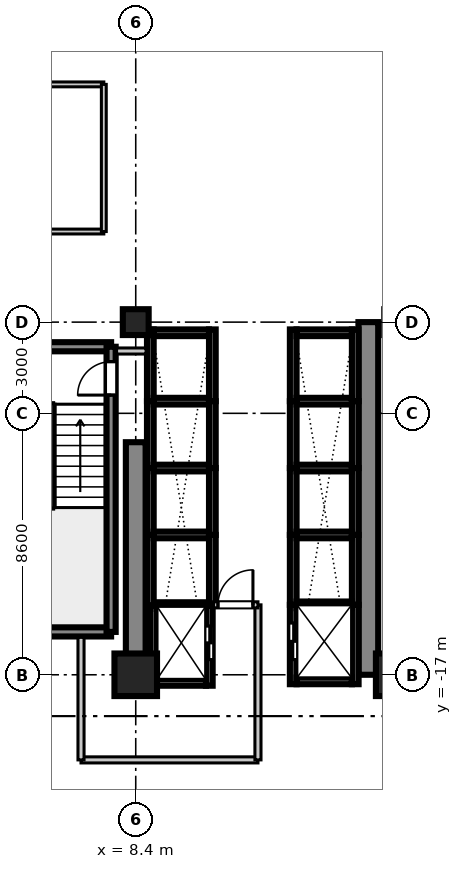
"""IFC4 building model, lengths in metres.
Left out: names, types, materials, properties, quantities, classifications, styles, units other than length and angle.
Written with IfcOpenShell. Run it as: python <this file> out.ifc"""

import sys

from ifc_helpers import new_model, si_unit, direction, frame, frame_2d, origin, origin_2d, place, context, subcontext, project, spatial, rectangle, extrude, source, transform, mapped, element, fill, save


model = new_model("IFC4")
c1 = context("Model", 3, precision=1e-05, world=origin(), true_north=direction((0.0, 1.0)))
c2 = subcontext(c1, "Body", "Model", "MODEL_VIEW")
j1 = project(units=[si_unit("LENGTHUNIT", "METRE"), si_unit("PLANEANGLEUNIT", "RADIAN")], contexts=[c1])
p1 = place(None, origin())
s1 = spatial("IfcSite", under=j1, at=p1, CompositionType="ELEMENT")
p2 = place(p1, origin())
s2 = spatial("IfcBuilding", under=s1, at=p2, CompositionType="ELEMENT")
p3 = place(p2, frame((0.0, 0.0, 32.4)))
s3 = spatial("IfcBuildingStorey", under=s2, at=p3, CompositionType="ELEMENT", Elevation=32.4)
m1 = source(origin(), c2, "Body", "SweptSolid", [
    extrude(rectangle(XDim=1.4, YDim=1.4, at=origin_2d()), origin(), (0.0, 0.0, 1.0), 3.605),
])
p4 = place(p3, frame((8.4, -17.0, 0.0), z_axis=(0.0, 0.0, 1.0), x_axis=(1.0, 0.0, 0.0)))
e1 = element("IfcColumn", 1, at=p4, inside=s3, PredefinedType="COLUMN", context=c2, shape_type="MappedRepresentation", body=[
    mapped(m1, transform((0.0, 0.0, 0.0), scale=1.0)),
])
m2 = source(origin(), c2, "Body", "SweptSolid", [
    extrude(rectangle(XDim=0.85, YDim=0.85, at=origin_2d()), origin(), (0.0, 0.0, 1.0), 3.605),
])
p5 = place(p3, frame((8.4, -5.4, 0.0), z_axis=(0.0, 0.0, 1.0), x_axis=(1.0, 0.0, 0.0)))
e2 = element("IfcColumn", 2, at=p5, inside=s3, PredefinedType="PILASTER", context=c2, shape_type="MappedRepresentation", body=[
    mapped(m2, transform((0.0, 0.0, 0.0), scale=1.0)),
])
p6 = place(p3, frame((17.0, -17.0, 0.0), z_axis=(0.0, 0.0, 1.0), x_axis=(1.0, 0.0, 0.0)))
e3 = element("IfcColumn", 3, at=p6, inside=s3, PredefinedType="COLUMN", context=c2, shape_type="MappedRepresentation", body=[
    mapped(m1, transform((0.0, 0.0, 0.0), scale=1.0)),
])
m3 = source(origin(), c2, "Body", "SweptSolid", [
    extrude(rectangle(XDim=7.65, YDim=0.65, at=frame_2d((3.825, 0.0))), origin(), (0.0, 0.0, 1.0), 3.37),
])
p7 = place(p3, frame((8.4, -17.0, 0.0), z_axis=(0.0, 0.0, 1.0), x_axis=(0.0, 1.0, 0.0)))
e4 = element("IfcWall", 4, at=p7, inside=s3, PredefinedType="SHEAR", context=c2, shape_type="MappedRepresentation", body=[
    mapped(m3, transform((0.0, 0.0, 0.0), scale=1.0)),
])
m4 = source(origin(), c2, "Body", "SweptSolid", [
    extrude(rectangle(XDim=11.6, YDim=0.65, at=frame_2d((5.8, 0.0))), origin(), (0.0, 0.0, 1.0), 3.37),
])
p8 = place(p3, frame((16.05, -17.0, 0.0), z_axis=(0.0, 0.0, 1.0), x_axis=(0.0, 1.0, 0.0)))
e5 = element("IfcWall", 5, at=p8, inside=s3, PredefinedType="SHEAR", context=c2, shape_type="MappedRepresentation", body=[
    mapped(m4, transform((0.0, 0.0, 0.0), scale=1.0)),
])
m5 = source(origin(), c2, "Body", "SweptSolid", [
    extrude(rectangle(XDim=3.98, YDim=0.3, at=frame_2d((1.99, 0.0))), origin(), (0.0, 0.0, 1.0), 3.37),
])
for number, where, z_axis, x_axis in (
    (6, (3.61, -15.59, 0.0), (0.0, 0.0, 1.0), (1.0, 0.0, 0.0)),
    (7, (3.61, -6.21, 0.0), (0.0, 0.0, 1.0), (1.0, 0.0, 0.0)),
):
    element("IfcWall", number, at=place(p3, frame(where, z_axis=z_axis, x_axis=x_axis)), inside=s3, PredefinedType="SHEAR", context=c2, shape_type="MappedRepresentation", body=[
        mapped(m5, transform((0.0, 0.0, 0.0), scale=1.0)),
    ])
m6 = source(origin(), c2, "Body", "SweptSolid", [
    extrude(rectangle(XDim=9.38, YDim=0.3, at=frame_2d((4.69, 0.0))), origin(), (0.0, 0.0, 1.0), 3.37),
])
p9 = place(p3, frame((7.59, -15.59, 0.0), z_axis=(0.0, 0.0, 1.0), x_axis=(0.0, 1.0, 0.0)))
e8 = element("IfcWall", 8, at=p9, inside=s3, PredefinedType="SHEAR", context=c2, shape_type="MappedRepresentation", body=[
    mapped(m6, transform((0.0, 0.0, 0.0), scale=1.0)),
])
p10 = place(p9, frame((7.79, 0.0, 0.0)))
e9 = element("IfcOpeningElement", 9, at=p10, cuts=e8, PredefinedType="OPENING", context=c2, shape_type="SweptSolid", body=[
    extrude(rectangle(XDim=1.1, YDim=2.15, at=frame_2d((0.55, 1.075))), frame((0.0, 0.16, 0.0), z_axis=(0.0, -1.0, 0.0), x_axis=(1.0, 0.0, 0.0)), (0.0, 0.0, 1.0), 0.32),
])
m7 = source(origin(), c2, "Body", "SweptSolid", [
    extrude(rectangle(XDim=2.36, YDim=0.22, at=frame_2d((1.18, 0.0))), origin(), (0.0, 0.0, 1.0), 3.37),
])
for number, where, z_axis, x_axis in (
    (10, (13.58, -8.0, 0.0), (0.0, 0.0, 1.0), (0.0, 1.0, 0.0)),
    (11, (15.62, -8.0, 0.0), (0.0, 0.0, 1.0), (0.0, 1.0, 0.0)),
):
    element("IfcWall", number, at=place(p3, frame(where, z_axis=z_axis, x_axis=x_axis)), inside=s3, PredefinedType="SHEAR", context=c2, shape_type="MappedRepresentation", body=[
        mapped(m7, transform((0.0, 0.0, 0.0), scale=1.0)),
    ])
m8 = source(origin(), c2, "Body", "SweptSolid", [
    extrude(rectangle(XDim=1.82, YDim=0.22, at=frame_2d((0.91, 0.0))), origin(), (0.0, 0.0, 1.0), 3.37),
])
p11 = place(p3, frame((13.69, -5.75, 0.0), z_axis=(0.0, 0.0, 1.0), x_axis=(1.0, 0.0, 0.0)))
e12 = element("IfcWall", 12, at=p11, inside=s3, PredefinedType="SHEAR", context=c2, shape_type="MappedRepresentation", body=[
    mapped(m8, transform((0.0, 0.0, 0.0), scale=1.0)),
])
m9 = source(origin(), c2, "Body", "SweptSolid", [
    extrude(rectangle(XDim=2.2, YDim=0.22, at=frame_2d((1.1, 0.0))), origin(), (0.0, 0.0, 1.0), 3.37),
])
for number, where, z_axis, x_axis in (
    (13, (13.58, -10.2, 0.0), (0.0, 0.0, 1.0), (0.0, 1.0, 0.0)),
    (14, (15.62, -10.2, 0.0), (0.0, 0.0, 1.0), (0.0, 1.0, 0.0)),
):
    element("IfcWall", number, at=place(p3, frame(where, z_axis=z_axis, x_axis=x_axis)), inside=s3, PredefinedType="SHEAR", context=c2, shape_type="MappedRepresentation", body=[
        mapped(m9, transform((0.0, 0.0, 0.0), scale=1.0)),
    ])
m10 = source(origin(), c2, "Body", "SweptSolid", [
    extrude(rectangle(XDim=1.82, YDim=0.22, at=frame_2d((0.91, 0.0))), origin(), (0.0, 0.0, 1.0), 3.65),
])
p12 = place(p3, frame((13.69, -8.0, 0.0), z_axis=(0.0, 0.0, 1.0), x_axis=(1.0, 0.0, 0.0)))
e15 = element("IfcWall", 15, at=p12, inside=s3, PredefinedType="SHEAR", context=c2, shape_type="MappedRepresentation", body=[
    mapped(m10, transform((0.0, 0.0, 0.0), scale=1.0)),
])
for number, where, z_axis, x_axis in (
    (16, (13.58, -12.4, 0.0), (0.0, 0.0, 1.0), (0.0, 1.0, 0.0)),
    (17, (15.62, -12.4, 0.0), (0.0, 0.0, 1.0), (0.0, 1.0, 0.0)),
):
    element("IfcWall", number, at=place(p3, frame(where, z_axis=z_axis, x_axis=x_axis)), inside=s3, PredefinedType="SHEAR", context=c2, shape_type="MappedRepresentation", body=[
        mapped(m9, transform((0.0, 0.0, 0.0), scale=1.0)),
    ])
p13 = place(p3, frame((13.69, -10.2, 0.0), z_axis=(0.0, 0.0, 1.0), x_axis=(1.0, 0.0, 0.0)))
e18 = element("IfcWall", 18, at=p13, inside=s3, PredefinedType="SHEAR", context=c2, shape_type="MappedRepresentation", body=[
    mapped(m10, transform((0.0, 0.0, 0.0), scale=1.0)),
])
m11 = source(origin(), c2, "Body", "SweptSolid", [
    extrude(rectangle(XDim=2.3, YDim=0.22, at=frame_2d((1.15, 0.0))), origin(), (0.0, 0.0, 1.0), 3.37),
])
for number, where, z_axis, x_axis in (
    (19, (13.58, -14.7, 0.0), (0.0, 0.0, 1.0), (0.0, 1.0, 0.0)),
    (20, (15.62, -14.7, 0.0), (0.0, 0.0, 1.0), (0.0, 1.0, 0.0)),
):
    element("IfcWall", number, at=place(p3, frame(where, z_axis=z_axis, x_axis=x_axis)), inside=s3, PredefinedType="SHEAR", context=c2, shape_type="MappedRepresentation", body=[
        mapped(m11, transform((0.0, 0.0, 0.0), scale=1.0)),
    ])
p14 = place(p3, frame((13.69, -12.4, 0.0), z_axis=(0.0, 0.0, 1.0), x_axis=(1.0, 0.0, 0.0)))
e21 = element("IfcWall", 21, at=p14, inside=s3, PredefinedType="SHEAR", context=c2, shape_type="MappedRepresentation", body=[
    mapped(m10, transform((0.0, 0.0, 0.0), scale=1.0)),
])
for number, where, z_axis, x_axis in (
    (22, (8.88, -8.0, 0.0), (0.0, 0.0, 1.0), (0.0, 1.0, 0.0)),
    (23, (10.92, -8.0, 0.0), (0.0, 0.0, 1.0), (0.0, 1.0, 0.0)),
):
    element("IfcWall", number, at=place(p3, frame(where, z_axis=z_axis, x_axis=x_axis)), inside=s3, PredefinedType="SHEAR", context=c2, shape_type="MappedRepresentation", body=[
        mapped(m7, transform((0.0, 0.0, 0.0), scale=1.0)),
    ])
p15 = place(p3, frame((8.99, -5.75, 0.0), z_axis=(0.0, 0.0, 1.0), x_axis=(1.0, 0.0, 0.0)))
e24 = element("IfcWall", 24, at=p15, inside=s3, PredefinedType="SHEAR", context=c2, shape_type="MappedRepresentation", body=[
    mapped(m8, transform((0.0, 0.0, 0.0), scale=1.0)),
])
for number, where, z_axis, x_axis in (
    (25, (8.88, -10.2, 0.0), (0.0, 0.0, 1.0), (0.0, 1.0, 0.0)),
    (26, (10.92, -10.2, 0.0), (0.0, 0.0, 1.0), (0.0, 1.0, 0.0)),
):
    element("IfcWall", number, at=place(p3, frame(where, z_axis=z_axis, x_axis=x_axis)), inside=s3, PredefinedType="SHEAR", context=c2, shape_type="MappedRepresentation", body=[
        mapped(m9, transform((0.0, 0.0, 0.0), scale=1.0)),
    ])
p16 = place(p3, frame((8.99, -8.0, 0.0), z_axis=(0.0, 0.0, 1.0), x_axis=(1.0, 0.0, 0.0)))
e27 = element("IfcWall", 27, at=p16, inside=s3, PredefinedType="SHEAR", context=c2, shape_type="MappedRepresentation", body=[
    mapped(m10, transform((0.0, 0.0, 0.0), scale=1.0)),
])
for number, where, z_axis, x_axis in (
    (28, (8.88, -12.4, 0.0), (0.0, 0.0, 1.0), (0.0, 1.0, 0.0)),
    (29, (10.92, -12.4, 0.0), (0.0, 0.0, 1.0), (0.0, 1.0, 0.0)),
):
    element("IfcWall", number, at=place(p3, frame(where, z_axis=z_axis, x_axis=x_axis)), inside=s3, PredefinedType="SHEAR", context=c2, shape_type="MappedRepresentation", body=[
        mapped(m9, transform((0.0, 0.0, 0.0), scale=1.0)),
    ])
p17 = place(p3, frame((8.99, -10.2, 0.0), z_axis=(0.0, 0.0, 1.0), x_axis=(1.0, 0.0, 0.0)))
e30 = element("IfcWall", 30, at=p17, inside=s3, PredefinedType="SHEAR", context=c2, shape_type="MappedRepresentation", body=[
    mapped(m10, transform((0.0, 0.0, 0.0), scale=1.0)),
])
m12 = source(origin(), c2, "Body", "SweptSolid", [
    extrude(rectangle(XDim=2.325, YDim=0.22, at=frame_2d((1.163, 0.0))), origin(), (0.0, 0.0, 1.0), 3.37),
])
for number, where, z_axis, x_axis in (
    (31, (8.88, -14.725, 0.0), (0.0, 0.0, 1.0), (0.0, 1.0, 0.0)),
    (32, (10.92, -14.725, 0.0), (0.0, 0.0, 1.0), (0.0, 1.0, 0.0)),
):
    element("IfcWall", number, at=place(p3, frame(where, z_axis=z_axis, x_axis=x_axis)), inside=s3, PredefinedType="SHEAR", context=c2, shape_type="MappedRepresentation", body=[
        mapped(m12, transform((0.0, 0.0, 0.0), scale=1.0)),
    ])
p18 = place(p3, frame((8.99, -12.4, 0.0), z_axis=(0.0, 0.0, 1.0), x_axis=(1.0, 0.0, 0.0)))
e33 = element("IfcWall", 33, at=p18, inside=s3, PredefinedType="SHEAR", context=c2, shape_type="MappedRepresentation", body=[
    mapped(m10, transform((0.0, 0.0, 0.0), scale=1.0)),
])
m13 = source(origin(), c2, "Body", "SweptSolid", [
    extrude(rectangle(XDim=2.635, YDim=0.22, at=frame_2d((1.317, 0.0))), origin(), (0.0, 0.0, 1.0), 3.37),
])
p19 = place(p3, frame((8.98, -17.36, 0.0), z_axis=(0.0, 0.0, 1.0), x_axis=(0.0, 1.0, 0.0)))
e34 = element("IfcWall", 34, at=p19, inside=s3, PredefinedType="SHEAR", context=c2, shape_type="MappedRepresentation", body=[
    mapped(m13, transform((0.0, 0.0, 0.0), scale=1.0)),
])
p20 = place(p3, frame((10.82, -17.36, 0.0), z_axis=(0.0, 0.0, 1.0), x_axis=(0.0, 1.0, 0.0)))
e35 = element("IfcWall", 35, at=p20, inside=s3, PredefinedType="SHEAR", context=c2, shape_type="MappedRepresentation", body=[
    mapped(m13, transform((0.0, 0.0, 0.0), scale=1.0)),
])
p21 = place(p20, frame((0.86, 0.0, 0.0)))
e36 = element("IfcOpeningElement", 36, at=p21, cuts=e35, PredefinedType="OPENING", context=c2, shape_type="SweptSolid", body=[
    extrude(rectangle(XDim=1.1, YDim=2.2, at=frame_2d((0.55, 1.1))), frame((0.0, 0.12, 0.0), z_axis=(0.0, -1.0, 0.0), x_axis=(1.0, 0.0, 0.0)), (0.0, 0.0, 1.0), 0.24),
])
m14 = source(origin(), c2, "Body", "SweptSolid", [
    extrude(rectangle(XDim=1.62, YDim=0.22, at=frame_2d((0.81, 0.0))), origin(), (0.0, 0.0, 1.0), 3.37),
])
p22 = place(p3, frame((9.09, -17.25, 0.0), z_axis=(0.0, 0.0, 1.0), x_axis=(1.0, 0.0, 0.0)))
e37 = element("IfcWall", 37, at=p22, inside=s3, PredefinedType="SHEAR", context=c2, shape_type="MappedRepresentation", body=[
    mapped(m14, transform((0.0, 0.0, 0.0), scale=1.0)),
])
m15 = source(origin(), c2, "Body", "SweptSolid", [
    extrude(rectangle(XDim=1.62, YDim=0.22, at=frame_2d((0.81, 0.0))), origin(), (0.0, 0.0, 1.0), 3.65),
])
p23 = place(p3, frame((9.09, -14.725, 0.0), z_axis=(0.0, 0.0, 1.0), x_axis=(1.0, 0.0, 0.0)))
e38 = element("IfcWall", 38, at=p23, inside=s3, PredefinedType="SHEAR", context=c2, shape_type="MappedRepresentation", body=[
    mapped(m15, transform((0.0, 0.0, 0.0), scale=1.0)),
])
m16 = source(origin(), c2, "Body", "SweptSolid", [
    extrude(rectangle(XDim=2.61, YDim=0.22, at=frame_2d((1.305, 0.0))), origin(), (0.0, 0.0, 1.0), 3.37),
])
p24 = place(p3, frame((13.58, -17.31, 0.0), z_axis=(0.0, 0.0, 1.0), x_axis=(0.0, 1.0, 0.0)))
e39 = element("IfcWall", 39, at=p24, inside=s3, PredefinedType="SHEAR", context=c2, shape_type="MappedRepresentation", body=[
    mapped(m16, transform((0.0, 0.0, 0.0), scale=1.0)),
])
p25 = place(p24, frame((0.81, 0.0, 0.0)))
e40 = element("IfcOpeningElement", 40, at=p25, cuts=e39, PredefinedType="OPENING", context=c2, shape_type="SweptSolid", body=[
    extrude(rectangle(XDim=1.2, YDim=2.2, at=frame_2d((0.6, 1.1))), frame((0.0, 0.12, 0.0), z_axis=(0.0, -1.0, 0.0), x_axis=(1.0, 0.0, 0.0)), (0.0, 0.0, 1.0), 0.24),
])
p26 = place(p3, frame((15.62, -17.31, 0.0), z_axis=(0.0, 0.0, 1.0), x_axis=(0.0, 1.0, 0.0)))
e41 = element("IfcWall", 41, at=p26, inside=s3, PredefinedType="SHEAR", context=c2, shape_type="MappedRepresentation", body=[
    mapped(m16, transform((0.0, 0.0, 0.0), scale=1.0)),
])
p27 = place(p3, frame((13.69, -17.2, 0.0), z_axis=(0.0, 0.0, 1.0), x_axis=(1.0, 0.0, 0.0)))
e42 = element("IfcWall", 42, at=p27, inside=s3, PredefinedType="SHEAR", context=c2, shape_type="MappedRepresentation", body=[
    mapped(m8, transform((0.0, 0.0, 0.0), scale=1.0)),
])
p28 = place(p3, frame((13.69, -14.7, 0.0), z_axis=(0.0, 0.0, 1.0), x_axis=(1.0, 0.0, 0.0)))
e43 = element("IfcWall", 43, at=p28, inside=s3, PredefinedType="SHEAR", context=c2, shape_type="MappedRepresentation", body=[
    mapped(m10, transform((0.0, 0.0, 0.0), scale=1.0)),
])
m17 = source(origin(), c2, "Body", "SweptSolid", [
    extrude(rectangle(XDim=5.82, YDim=0.2, at=frame_2d((2.91, 0.0))), origin(), (0.0, 0.0, 1.0), 2.71),
])
p29 = place(p3, frame((6.6, -19.8, 0.0), z_axis=(0.0, 0.0, 1.0), x_axis=(1.0, 0.0, 0.0)))
e44 = element("IfcWall", 44, at=p29, inside=s3, PredefinedType="PARTITIONING", context=c2, shape_type="MappedRepresentation", body=[
    mapped(m17, transform((0.0, 0.0, 0.0), scale=1.0)),
])
m18 = source(origin(), c2, "Body", "SweptSolid", [
    extrude(rectangle(XDim=4.03, YDim=0.2, at=frame_2d((2.015, 0.0))), origin(), (0.0, 0.0, 1.0), 2.71),
])
p30 = place(p3, frame((6.6, -19.8, 0.0), z_axis=(0.0, 0.0, 1.0), x_axis=(0.0, 1.0, 0.0)))
e45 = element("IfcWall", 45, at=p30, inside=s3, PredefinedType="PARTITIONING", context=c2, shape_type="MappedRepresentation", body=[
    mapped(m18, transform((0.0, 0.0, 0.0), scale=1.0)),
])
m19 = source(origin(), c2, "Body", "SweptSolid", [
    extrude(rectangle(XDim=5.1, YDim=0.2, at=frame_2d((2.55, 0.0))), origin(), (0.0, 0.0, 1.0), 2.71),
])
p31 = place(p3, frame((12.42, -19.8, 0.0), z_axis=(0.0, 0.0, 1.0), x_axis=(0.0, 1.0, 0.0)))
e46 = element("IfcWall", 46, at=p31, inside=s3, PredefinedType="PARTITIONING", context=c2, shape_type="MappedRepresentation", body=[
    mapped(m19, transform((0.0, 0.0, 0.0), scale=1.0)),
])
m20 = source(origin(), c2, "Body", "SweptSolid", [
    extrude(rectangle(XDim=1.46, YDim=0.2, at=frame_2d((0.73, 0.0))), origin(), (0.0, 0.0, 1.0), 2.71),
])
p32 = place(p3, frame((10.96, -14.7, 0.0), z_axis=(0.0, 0.0, 1.0), x_axis=(1.0, 0.0, 0.0)))
e47 = element("IfcWall", 47, at=p32, inside=s3, PredefinedType="PARTITIONING", context=c2, shape_type="MappedRepresentation", body=[
    mapped(m20, transform((0.0, 0.0, 0.0), scale=1.0)),
])
p33 = place(p32, frame((0.145, 0.0, 0.0)))
e48 = element("IfcOpeningElement", 48, at=p33, cuts=e47, PredefinedType="OPENING", context=c2, shape_type="SweptSolid", body=[
    extrude(rectangle(XDim=1.15, YDim=2.15, at=frame_2d((0.575, 1.075))), frame((0.0, 0.11, 0.0), z_axis=(0.0, -1.0, 0.0), x_axis=(1.0, 0.0, 0.0)), (0.0, 0.0, 1.0), 0.22),
])
m21 = source(origin(), c2, "Body", "SweptSolid", [
    extrude(rectangle(XDim=0.97, YDim=0.2, at=frame_2d((0.485, 0.0))), origin(), (0.0, 0.0, 1.0), 2.71),
])
p34 = place(p3, frame((7.77, -6.35, 0.0), z_axis=(0.0, 0.0, 1.0), x_axis=(1.0, 0.0, 0.0)))
e49 = element("IfcWall", 49, at=p34, inside=s3, PredefinedType="PARTITIONING", context=c2, shape_type="MappedRepresentation", body=[
    mapped(m21, transform((0.0, 0.0, 0.0), scale=1.0)),
])
m22 = source(origin(), c2, "Body", "SweptSolid", [
    extrude(rectangle(XDim=11.948, YDim=0.16, at=frame_2d((5.974, 0.0))), origin(), (0.0, 0.0, 1.0), 2.71),
])
p35 = place(p3, frame((-4.598, -2.42, 0.0), z_axis=(0.0, 0.0, 1.0), x_axis=(1.0, 0.0, 0.0)))
e50 = element("IfcWall", 50, at=p35, inside=s3, PredefinedType="PARTITIONING", context=c2, shape_type="MappedRepresentation", body=[
    mapped(m22, transform((0.0, 0.0, 0.0), scale=1.0)),
])
p36 = place(p35, frame((3.895, 0.0, 0.0)))
e51 = element("IfcOpeningElement", 51, at=p36, cuts=e50, PredefinedType="OPENING", context=c2, shape_type="SweptSolid", body=[
    extrude(rectangle(XDim=1.5, YDim=2.15, at=frame_2d((0.75, 1.075))), frame((0.0, 0.09, 0.0), z_axis=(0.0, -1.0, 0.0), x_axis=(1.0, 0.0, 0.0)), (0.0, 0.0, 1.0), 0.18),
])
p37 = place(p3, frame((-4.598, 2.42, 0.0), z_axis=(0.0, 0.0, 1.0), x_axis=(1.0, 0.0, 0.0)))
e52 = element("IfcWall", 52, at=p37, inside=s3, PredefinedType="PARTITIONING", context=c2, shape_type="MappedRepresentation", body=[
    mapped(m22, transform((0.0, 0.0, 0.0), scale=1.0)),
])
m23 = source(origin(), c2, "Body", "SweptSolid", [
    extrude(rectangle(XDim=4.84, YDim=0.16, at=frame_2d((2.42, 0.0))), origin(), (0.0, 0.0, 1.0), 2.71),
])
p38 = place(p3, frame((7.35, -2.42, 0.0), z_axis=(0.0, 0.0, 1.0), x_axis=(0.0, 1.0, 0.0)))
e53 = element("IfcWall", 53, at=p38, inside=s3, PredefinedType="PARTITIONING", context=c2, shape_type="MappedRepresentation", body=[
    mapped(m23, transform((0.0, 0.0, 0.0), scale=1.0)),
])
m24 = source(origin(), c2, "Body", "SweptSolid", [
    extrude(rectangle(XDim=1.1, YDim=2.15, at=frame_2d((0.55, 1.075))), frame((0.0, 0.025, 0.0), z_axis=(0.0, -1.0, 0.0), x_axis=(1.0, 0.0, 0.0)), (0.0, 0.0, 1.0), 0.05),
])
p39 = place(p10, origin())
e54 = element("IfcDoor", 54, at=p39, inside=s3, OperationType="SINGLE_SWING_LEFT", PredefinedType="DOOR", context=c2, shape_type="MappedRepresentation", body=[
    mapped(m24, transform((0.0, 0.0, 0.0), scale=1.0)),
])
fill(e9, e54)
m25 = source(origin(), c2, "Body", "SweptSolid", [
    extrude(rectangle(XDim=1.1, YDim=2.2, at=frame_2d((0.55, 1.1))), frame((0.0, 0.025, 0.0), z_axis=(0.0, -1.0, 0.0), x_axis=(1.0, 0.0, 0.0)), (0.0, 0.0, 1.0), 0.05),
])
p40 = place(p21, frame((1.1, 0.0, 0.0), z_axis=(0.0, 0.0, 1.0), x_axis=(-1.0, 0.0, 0.0)))
e55 = element("IfcDoor", 55, at=p40, inside=s3, OperationType="DOUBLE_DOOR_SLIDING", PredefinedType="DOOR", context=c2, shape_type="MappedRepresentation", body=[
    mapped(m25, transform((0.0, 0.0, 0.0), scale=1.0)),
])
fill(e36, e55)
m26 = source(origin(), c2, "Body", "SweptSolid", [
    extrude(rectangle(XDim=1.2, YDim=2.2, at=frame_2d((0.6, 1.1))), frame((0.0, 0.025, 0.0), z_axis=(0.0, -1.0, 0.0), x_axis=(1.0, 0.0, 0.0)), (0.0, 0.0, 1.0), 0.05),
])
p41 = place(p25, origin())
e56 = element("IfcDoor", 56, at=p41, inside=s3, OperationType="DOUBLE_DOOR_SLIDING", PredefinedType="DOOR", context=c2, shape_type="MappedRepresentation", body=[
    mapped(m26, transform((0.0, 0.0, 0.0), scale=1.0)),
])
fill(e40, e56)
m27 = source(origin(), c2, "Body", "SweptSolid", [
    extrude(rectangle(XDim=1.15, YDim=2.15, at=frame_2d((0.575, 1.075))), frame((0.0, 0.025, 0.0), z_axis=(0.0, -1.0, 0.0), x_axis=(1.0, 0.0, 0.0)), (0.0, 0.0, 1.0), 0.05),
])
p42 = place(p33, origin())
e57 = element("IfcDoor", 57, at=p42, inside=s3, OperationType="SINGLE_SWING_RIGHT", PredefinedType="DOOR", context=c2, shape_type="MappedRepresentation", body=[
    mapped(m27, transform((0.0, 0.0, 0.0), scale=1.0)),
])
fill(e48, e57)
save(model, sys.argv[1])
